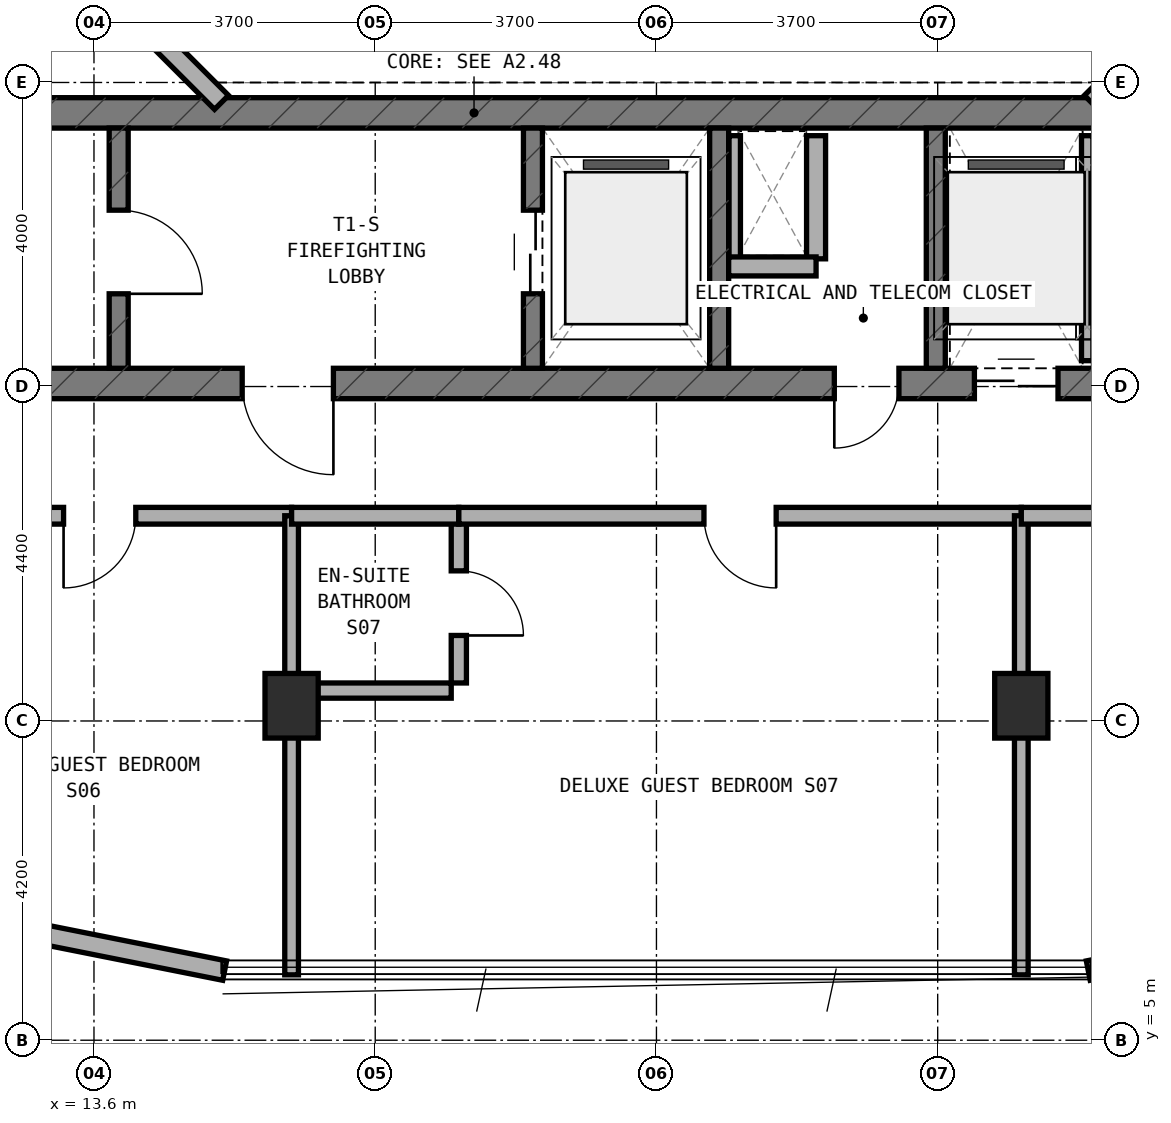
"""IFC4 building model, lengths in metres.
Left out: names, types, materials, properties, quantities, classifications, styles, units other than length and angle.
Written with IfcOpenShell. Run it as: python <this file> out.ifc"""

import sys

from ifc_helpers import new_model, si_unit, direction, frame, frame_2d, origin, origin_2d, place, context, subcontext, project, spatial, rectangle, extrude, element, fill, save


model = new_model("IFC4")
c1 = context("Model", 3, precision=1e-05, world=origin(), true_north=direction((0.0, 1.0)))
c2 = subcontext(c1, "Body", "Model", "MODEL_VIEW")
j1 = project(units=[si_unit("LENGTHUNIT", "METRE"), si_unit("PLANEANGLEUNIT", "RADIAN")], contexts=[c1])
p1 = place(None, origin())
s1 = spatial("IfcSite", under=j1, at=p1, CompositionType="ELEMENT")
p2 = place(p1, origin())
s2 = spatial("IfcBuilding", under=s1, at=p2, CompositionType="ELEMENT")
p3 = place(p2, frame((0.0, 0.0, 224.3)))
s3 = spatial("IfcBuildingStorey", under=s2, at=p3, CompositionType="ELEMENT", Elevation=224.3)
p4 = place(p3, frame((6.4, 13.64, 0.0), z_axis=(0.0, 0.0, 1.0), x_axis=(1.0, 0.0, 0.0)))
e1 = element("IfcWall", 1, at=p4, inside=s3, PredefinedType="SHEAR", context=c2, shape_type="SweptSolid", body=[
    extrude(rectangle(XDim=24.4, YDim=0.4, at=frame_2d((12.2, 0.0))), origin(), (0.0, 0.0, 1.0), 3.6),
])
p5 = place(p4, frame((9.15, 0.0, 0.0)))
e2 = element("IfcOpeningElement", 2, at=p5, cuts=e1, PredefinedType="OPENING", context=c2, shape_type="SweptSolid", body=[
    extrude(rectangle(XDim=1.2, YDim=2.15, at=frame_2d((0.6, 1.075))), frame((0.0, 0.21, 0.0), z_axis=(0.0, -1.0, 0.0), x_axis=(1.0, 0.0, 0.0)), (0.0, 0.0, 1.0), 0.42),
])
p6 = place(p4, frame((16.94, 0.0, 0.0)))
e3 = element("IfcOpeningElement", 3, at=p6, cuts=e1, PredefinedType="OPENING", context=c2, shape_type="SweptSolid", body=[
    extrude(rectangle(XDim=0.85, YDim=2.1, at=frame_2d((0.425, 1.05))), frame((0.0, 0.21, 0.0), z_axis=(0.0, -1.0, 0.0), x_axis=(1.0, 0.0, 0.0)), (0.0, 0.0, 1.0), 0.42),
])
p7 = place(p4, frame((18.783, 0.0, 0.0)))
e4 = element("IfcOpeningElement", 4, at=p7, cuts=e1, PredefinedType="OPENING", context=c2, shape_type="SweptSolid", body=[
    extrude(rectangle(XDim=1.1, YDim=2.15, at=frame_2d((0.55, 1.075))), frame((0.0, 0.21, 0.0), z_axis=(0.0, -1.0, 0.0), x_axis=(1.0, 0.0, 0.0)), (0.0, 0.0, 1.0), 0.42),
])
p8 = place(p4, frame((20.65, 0.0, 0.0)))
e5 = element("IfcOpeningElement", 5, at=p8, cuts=e1, PredefinedType="OPENING", context=c2, shape_type="SweptSolid", body=[
    extrude(rectangle(XDim=1.1, YDim=2.15, at=frame_2d((0.55, 1.075))), frame((0.0, 0.21, 0.0), z_axis=(0.0, -1.0, 0.0), x_axis=(1.0, 0.0, 0.0)), (0.0, 0.0, 1.0), 0.42),
])
p9 = place(p4, frame((22.517, 0.0, 0.0)))
e6 = element("IfcOpeningElement", 6, at=p9, cuts=e1, PredefinedType="OPENING", context=c2, shape_type="SweptSolid", body=[
    extrude(rectangle(XDim=1.1, YDim=2.15, at=frame_2d((0.55, 1.075))), frame((0.0, 0.21, 0.0), z_axis=(0.0, -1.0, 0.0), x_axis=(1.0, 0.0, 0.0)), (0.0, 0.0, 1.0), 0.42),
])
p10 = place(p3, frame((6.4, 17.2, 0.0), z_axis=(0.0, 0.0, 1.0), x_axis=(1.0, 0.0, 0.0)))
e7 = element("IfcWall", 7, at=p10, inside=s3, PredefinedType="SHEAR", context=c2, shape_type="SweptSolid", body=[
    extrude(rectangle(XDim=24.4, YDim=0.4, at=frame_2d((12.2, 0.0))), origin(), (0.0, 0.0, 1.0), 3.6),
])
p11 = place(p3, frame((13.925, 13.84, 0.0), z_axis=(0.0, 0.0, 1.0), x_axis=(0.0, 1.0, 0.0)))
e8 = element("IfcWall", 8, at=p11, inside=s3, PredefinedType="STANDARD", context=c2, shape_type="SweptSolid", body=[
    extrude(rectangle(XDim=3.16, YDim=0.25, at=frame_2d((1.58, 0.0))), origin(), (0.0, 0.0, 1.0), 3.32),
])
p12 = place(p11, frame((0.98, 0.0, 0.0)))
e9 = element("IfcOpeningElement", 9, at=p12, cuts=e8, PredefinedType="OPENING", context=c2, shape_type="SweptSolid", body=[
    extrude(rectangle(XDim=1.1, YDim=2.15, at=frame_2d((0.55, 1.075))), frame((0.0, 0.135, 0.0), z_axis=(0.0, -1.0, 0.0), x_axis=(1.0, 0.0, 0.0)), (0.0, 0.0, 1.0), 0.27),
])
p13 = place(p3, frame((19.375, 13.84, 0.0), z_axis=(0.0, 0.0, 1.0), x_axis=(0.0, 1.0, 0.0)))
e10 = element("IfcWall", 10, at=p13, inside=s3, PredefinedType="STANDARD", context=c2, shape_type="SweptSolid", body=[
    extrude(rectangle(XDim=3.16, YDim=0.25, at=frame_2d((1.58, 0.0))), origin(), (0.0, 0.0, 1.0), 3.32),
])
p14 = place(p13, frame((0.98, 0.0, 0.0)))
e11 = element("IfcOpeningElement", 11, at=p14, cuts=e10, PredefinedType="OPENING", context=c2, shape_type="SweptSolid", body=[
    extrude(rectangle(XDim=1.1, YDim=2.15, at=frame_2d((0.55, 1.075))), frame((0.0, 0.135, 0.0), z_axis=(0.0, -1.0, 0.0), x_axis=(1.0, 0.0, 0.0)), (0.0, 0.0, 1.0), 0.27),
])
for number, where, z_axis, x_axis in (
    (12, (21.825, 13.84, 0.0), (0.0, 0.0, 1.0), (0.0, 1.0, 0.0)),
    (13, (24.675, 13.84, 0.0), (0.0, 0.0, 1.0), (0.0, 1.0, 0.0)),
):
    element("IfcWall", number, at=place(p3, frame(where, z_axis=z_axis, x_axis=x_axis)), inside=s3, PredefinedType="STANDARD", context=c2, shape_type="SweptSolid", body=[
        extrude(rectangle(XDim=3.16, YDim=0.25, at=frame_2d((1.58, 0.0))), origin(), (0.0, 0.0, 1.0), 3.32),
    ])
for number, where, z_axis, x_axis in (
    (14, (16.2, 9.4, 0.0), (0.0, 0.0, 1.0), (1.0, 0.0, 0.0)),
    (15, (25.8, 9.4, 0.0), (0.0, 0.0, 1.0), (1.0, 0.0, 0.0)),
):
    element("IfcColumn", number, at=place(p3, frame(where, z_axis=z_axis, x_axis=x_axis)), inside=s3, PredefinedType="COLUMN", context=c2, shape_type="SweptSolid", body=[
        extrude(rectangle(XDim=0.7, YDim=0.85, at=origin_2d()), origin(), (0.0, 0.0, 1.0), 3.6),
    ])
p15 = place(p3, frame((6.717, 7.629, 0.0), z_axis=(0.0, 0.0, 1.0), x_axis=(0.980745199176, -0.195291715883, 0.0)))
e16 = element("IfcWall", 16, at=p15, inside=s3, PredefinedType="STANDARD", context=c2, shape_type="SweptSolid", body=[
    extrude(rectangle(XDim=8.771, YDim=0.26, at=frame_2d((4.385, 0.0))), origin(), (0.0, 0.0, 1.0), 3.32),
])
p16 = place(p15, frame((3.925, 0.0, 0.85)))
e17 = element("IfcOpeningElement", 17, at=p16, cuts=e16, PredefinedType="OPENING", context=c2, shape_type="SweptSolid", body=[
    extrude(rectangle(XDim=2.1, YDim=1.5, at=frame_2d((1.05, 0.75))), frame((0.0, 0.14, 0.0), z_axis=(0.0, -1.0, 0.0), x_axis=(1.0, 0.0, 0.0)), (0.0, 0.0, 1.0), 0.28),
])
p17 = place(p3, frame((26.681, 5.916, 0.0), z_axis=(0.0, 0.0, 1.0), x_axis=(0.980745199176, 0.195291715883, 0.0)))
e18 = element("IfcWall", 18, at=p17, inside=s3, PredefinedType="STANDARD", context=c2, shape_type="SweptSolid", body=[
    extrude(rectangle(XDim=8.771, YDim=0.26, at=frame_2d((4.385, 0.0))), origin(), (0.0, 0.0, 1.0), 3.32),
])
p18 = place(p17, frame((2.746, 0.0, 0.85)))
e19 = element("IfcOpeningElement", 19, at=p18, cuts=e18, PredefinedType="OPENING", context=c2, shape_type="SweptSolid", body=[
    extrude(rectangle(XDim=2.1, YDim=1.5, at=frame_2d((1.05, 0.75))), frame((0.0, 0.14, 0.0), z_axis=(0.0, -1.0, 0.0), x_axis=(1.0, 0.0, 0.0)), (0.0, 0.0, 1.0), 0.28),
])
for number, where, z_axis, x_axis in (
    (20, (26.722, 17.338, 0.0), (0.0, 0.0, 1.0), (0.707, 0.707, 0.0)),
    (21, (13.444, 19.172, 0.0), (0.0, 0.0, 1.0), (0.707, -0.707, 0.0)),
):
    element("IfcWall", number, at=place(p3, frame(where, z_axis=z_axis, x_axis=x_axis)), inside=s3, PredefinedType="STANDARD", context=c2, shape_type="SweptSolid", body=[
        extrude(rectangle(XDim=2.594, YDim=0.26, at=frame_2d((1.297, 0.0))), origin(), (0.0, 0.0, 1.0), 3.32),
    ])
p19 = place(p3, frame((22.03, 15.28, 0.0), z_axis=(0.0, 0.0, 1.0), x_axis=(0.0, 1.0, 0.0)))
e22 = element("IfcWall", 22, at=p19, inside=s3, PredefinedType="PARTITIONING", context=c2, shape_type="SweptSolid", body=[
    extrude(rectangle(XDim=1.62, YDim=0.15, at=frame_2d((0.81, 0.0))), origin(), (0.0, 0.0, 1.0), 3.32),
])
p20 = place(p3, frame((23.1, 15.28, 0.0), z_axis=(0.0, 0.0, 1.0), x_axis=(0.0, 1.0, 0.0)))
e23 = element("IfcWall", 23, at=p20, inside=s3, PredefinedType="SOLIDWALL", context=c2, shape_type="SweptSolid", body=[
    extrude(rectangle(XDim=1.62, YDim=0.25, at=frame_2d((0.81, 0.0))), origin(), (0.0, 0.0, 1.0), 3.32),
])
p21 = place(p3, frame((21.95, 15.18, 0.0), z_axis=(0.0, 0.0, 1.0), x_axis=(1.0, 0.0, 0.0)))
e24 = element("IfcWall", 24, at=p21, inside=s3, PredefinedType="SOLIDWALL", context=c2, shape_type="SweptSolid", body=[
    extrude(rectangle(XDim=1.15, YDim=0.25, at=frame_2d((0.575, 0.0))), origin(), (0.0, 0.0, 1.0), 3.32),
])
p22 = place(p3, frame((26.667, 13.94, 0.0), z_axis=(0.0, 0.0, 1.0), x_axis=(0.0, 1.0, 0.0)))
e25 = element("IfcWall", 25, at=p22, inside=s3, PredefinedType="PARTITIONING", context=c2, shape_type="SweptSolid", body=[
    extrude(rectangle(XDim=2.96, YDim=0.15, at=frame_2d((1.48, 0.0))), origin(), (0.0, 0.0, 1.0), 3.32),
])
p23 = place(p3, frame((11.15, 11.9, 0.0), z_axis=(0.0, 0.0, 1.0), x_axis=(1.0, 0.0, 0.0)))
e26 = element("IfcWall", 26, at=p23, inside=s3, PredefinedType="SOLIDWALL", context=c2, shape_type="SweptSolid", body=[
    extrude(rectangle(XDim=5.05, YDim=0.22, at=frame_2d((2.525, 0.0))), origin(), (0.0, 0.0, 1.0), 2.695),
])
p24 = place(p23, frame((2.05, 0.0, 0.0)))
e27 = element("IfcOpeningElement", 27, at=p24, cuts=e26, PredefinedType="OPENING", context=c2, shape_type="SweptSolid", body=[
    extrude(rectangle(XDim=0.95, YDim=2.1, at=frame_2d((0.475, 1.05))), frame((0.0, 0.12, 0.0), z_axis=(0.0, -1.0, 0.0), x_axis=(1.0, 0.0, 0.0)), (0.0, 0.0, 1.0), 0.24),
])
p25 = place(p3, frame((16.2, 5.86, 0.0), z_axis=(0.0, 0.0, 1.0), x_axis=(0.0, 1.0, 0.0)))
e28 = element("IfcWall", 28, at=p25, inside=s3, PredefinedType="SOLIDWALL", context=c2, shape_type="SweptSolid", body=[
    extrude(rectangle(XDim=6.04, YDim=0.18, at=frame_2d((3.02, 0.0))), origin(), (0.0, 0.0, 1.0), 2.695),
])
p26 = place(p3, frame((18.4, 9.7, 0.0), z_axis=(0.0, 0.0, 1.0), x_axis=(0.0, 1.0, 0.0)))
e29 = element("IfcWall", 29, at=p26, inside=s3, PredefinedType="PLUMBINGWALL", context=c2, shape_type="SweptSolid", body=[
    extrude(rectangle(XDim=2.1, YDim=0.2, at=frame_2d((1.05, 0.0))), origin(), (0.0, 0.0, 1.0), 3.055),
])
p27 = place(p26, frame((0.625, 0.0, 0.0)))
e30 = element("IfcOpeningElement", 30, at=p27, cuts=e29, PredefinedType="OPENING", context=c2, shape_type="SweptSolid", body=[
    extrude(rectangle(XDim=0.85, YDim=2.1, at=frame_2d((0.425, 1.05))), frame((0.0, 0.11, 0.0), z_axis=(0.0, -1.0, 0.0), x_axis=(1.0, 0.0, 0.0)), (0.0, 0.0, 1.0), 0.22),
])
p28 = place(p3, frame((16.3, 9.6, 0.0), z_axis=(0.0, 0.0, 1.0), x_axis=(1.0, 0.0, 0.0)))
e31 = element("IfcWall", 31, at=p28, inside=s3, PredefinedType="PLUMBINGWALL", context=c2, shape_type="SweptSolid", body=[
    extrude(rectangle(XDim=2.0, YDim=0.2, at=frame_2d((1.0, 0.0))), origin(), (0.0, 0.0, 1.0), 3.015),
])
p29 = place(p3, frame((16.2, 11.9, 0.0), z_axis=(0.0, 0.0, 1.0), x_axis=(1.0, 0.0, 0.0)))
e32 = element("IfcWall", 32, at=p29, inside=s3, PredefinedType="SOLIDWALL", context=c2, shape_type="SweptSolid", body=[
    extrude(rectangle(XDim=2.2, YDim=0.22, at=frame_2d((1.1, 0.0))), origin(), (0.0, 0.0, 1.0), 2.695),
])
p30 = place(p3, frame((18.4, 11.9, 0.0), z_axis=(0.0, 0.0, 1.0), x_axis=(1.0, 0.0, 0.0)))
e33 = element("IfcWall", 33, at=p30, inside=s3, PredefinedType="SOLIDWALL", context=c2, shape_type="SweptSolid", body=[
    extrude(rectangle(XDim=7.4, YDim=0.22, at=frame_2d((3.7, 0.0))), origin(), (0.0, 0.0, 1.0), 2.695),
])
p31 = place(p30, frame((3.225, 0.0, 0.0)))
e34 = element("IfcOpeningElement", 34, at=p31, cuts=e33, PredefinedType="OPENING", context=c2, shape_type="SweptSolid", body=[
    extrude(rectangle(XDim=0.95, YDim=2.1, at=frame_2d((0.475, 1.05))), frame((0.0, 0.12, 0.0), z_axis=(0.0, -1.0, 0.0), x_axis=(1.0, 0.0, 0.0)), (0.0, 0.0, 1.0), 0.24),
])
p32 = place(p3, frame((25.8, 5.86, 0.0), z_axis=(0.0, 0.0, 1.0), x_axis=(0.0, 1.0, 0.0)))
e35 = element("IfcWall", 35, at=p32, inside=s3, PredefinedType="SOLIDWALL", context=c2, shape_type="SweptSolid", body=[
    extrude(rectangle(XDim=6.04, YDim=0.18, at=frame_2d((3.02, 0.0))), origin(), (0.0, 0.0, 1.0), 2.695),
])
p33 = place(p3, frame((25.8, 11.9, 0.0), z_axis=(0.0, 0.0, 1.0), x_axis=(1.0, 0.0, 0.0)))
e36 = element("IfcWall", 36, at=p33, inside=s3, PredefinedType="SOLIDWALL", context=c2, shape_type="SweptSolid", body=[
    extrude(rectangle(XDim=5.05, YDim=0.22, at=frame_2d((2.525, 0.0))), origin(), (0.0, 0.0, 1.0), 2.695),
])
p34 = place(p33, frame((2.05, 0.0, 0.0)))
e37 = element("IfcOpeningElement", 37, at=p34, cuts=e36, PredefinedType="OPENING", context=c2, shape_type="SweptSolid", body=[
    extrude(rectangle(XDim=0.95, YDim=2.1, at=frame_2d((0.475, 1.05))), frame((0.0, 0.12, 0.0), z_axis=(0.0, -1.0, 0.0), x_axis=(1.0, 0.0, 0.0)), (0.0, 0.0, 1.0), 0.24),
])
p35 = place(p12, frame((1.1, 0.0, 0.0), z_axis=(0.0, 0.0, 1.0), x_axis=(-1.0, 0.0, 0.0)))
e38 = element("IfcDoor", 38, at=p35, inside=s3, OperationType="SINGLE_SWING_RIGHT", PredefinedType="DOOR", context=c2, shape_type="SweptSolid", body=[
    extrude(rectangle(XDim=1.1, YDim=2.15, at=frame_2d((0.55, 1.075))), frame((0.0, 0.025, 0.0), z_axis=(0.0, -1.0, 0.0), x_axis=(1.0, 0.0, 0.0)), (0.0, 0.0, 1.0), 0.05),
])
fill(e9, e38)
p36 = place(p5, frame((1.2, 0.0, 0.0), z_axis=(0.0, 0.0, 1.0), x_axis=(-1.0, 0.0, 0.0)))
e39 = element("IfcDoor", 39, at=p36, inside=s3, OperationType="SINGLE_SWING_LEFT", PredefinedType="DOOR", context=c2, shape_type="SweptSolid", body=[
    extrude(rectangle(XDim=1.2, YDim=2.15, at=frame_2d((0.6, 1.075))), frame((0.0, 0.025, 0.0), z_axis=(0.0, -1.0, 0.0), x_axis=(1.0, 0.0, 0.0)), (0.0, 0.0, 1.0), 0.05),
])
fill(e2, e39)
p37 = place(p14, origin())
e40 = element("IfcDoor", 40, at=p37, inside=s3, OperationType="DOUBLE_DOOR_SLIDING", PredefinedType="DOOR", context=c2, shape_type="SweptSolid", body=[
    extrude(rectangle(XDim=1.1, YDim=2.15, at=frame_2d((0.55, 1.075))), frame((0.0, 0.025, 0.0), z_axis=(0.0, -1.0, 0.0), x_axis=(1.0, 0.0, 0.0)), (0.0, 0.0, 1.0), 0.05),
])
fill(e11, e40)
p38 = place(p6, frame((0.85, 0.0, 0.0), z_axis=(0.0, 0.0, 1.0), x_axis=(-1.0, 0.0, 0.0)))
e41 = element("IfcDoor", 41, at=p38, inside=s3, OperationType="SINGLE_SWING_RIGHT", PredefinedType="DOOR", context=c2, shape_type="SweptSolid", body=[
    extrude(rectangle(XDim=0.85, YDim=2.1, at=frame_2d((0.425, 1.05))), frame((0.0, 0.025, 0.0), z_axis=(0.0, -1.0, 0.0), x_axis=(1.0, 0.0, 0.0)), (0.0, 0.0, 1.0), 0.05),
])
fill(e3, e41)
p39 = place(p7, frame((1.1, 0.0, 0.0), z_axis=(0.0, 0.0, 1.0), x_axis=(-1.0, 0.0, 0.0)))
e42 = element("IfcDoor", 42, at=p39, inside=s3, OperationType="DOUBLE_DOOR_SLIDING", PredefinedType="DOOR", context=c2, shape_type="SweptSolid", body=[
    extrude(rectangle(XDim=1.1, YDim=2.15, at=frame_2d((0.55, 1.075))), frame((0.0, 0.025, 0.0), z_axis=(0.0, -1.0, 0.0), x_axis=(1.0, 0.0, 0.0)), (0.0, 0.0, 1.0), 0.05),
])
fill(e4, e42)
p40 = place(p24, frame((0.95, 0.0, 0.0), z_axis=(0.0, 0.0, 1.0), x_axis=(-1.0, 0.0, 0.0)))
e43 = element("IfcDoor", 43, at=p40, inside=s3, OperationType="SINGLE_SWING_RIGHT", PredefinedType="DOOR", context=c2, shape_type="SweptSolid", body=[
    extrude(rectangle(XDim=0.95, YDim=2.1, at=frame_2d((0.475, 1.05))), frame((0.0, 0.025, 0.0), z_axis=(0.0, -1.0, 0.0), x_axis=(1.0, 0.0, 0.0)), (0.0, 0.0, 1.0), 0.05),
])
fill(e27, e43)
p41 = place(p27, frame((0.85, 0.0, 0.0), z_axis=(0.0, 0.0, 1.0), x_axis=(-1.0, 0.0, 0.0)))
e44 = element("IfcDoor", 44, at=p41, inside=s3, OperationType="SINGLE_SWING_RIGHT", PredefinedType="DOOR", context=c2, shape_type="SweptSolid", body=[
    extrude(rectangle(XDim=0.85, YDim=2.1, at=frame_2d((0.425, 1.05))), frame((0.0, 0.025, 0.0), z_axis=(0.0, -1.0, 0.0), x_axis=(1.0, 0.0, 0.0)), (0.0, 0.0, 1.0), 0.05),
])
fill(e30, e44)
p42 = place(p31, frame((0.95, 0.0, 0.0), z_axis=(0.0, 0.0, 1.0), x_axis=(-1.0, 0.0, 0.0)))
e45 = element("IfcDoor", 45, at=p42, inside=s3, OperationType="SINGLE_SWING_LEFT", PredefinedType="DOOR", context=c2, shape_type="SweptSolid", body=[
    extrude(rectangle(XDim=0.95, YDim=2.1, at=frame_2d((0.475, 1.05))), frame((0.0, 0.025, 0.0), z_axis=(0.0, -1.0, 0.0), x_axis=(1.0, 0.0, 0.0)), (0.0, 0.0, 1.0), 0.05),
])
fill(e34, e45)
save(model, sys.argv[1])
